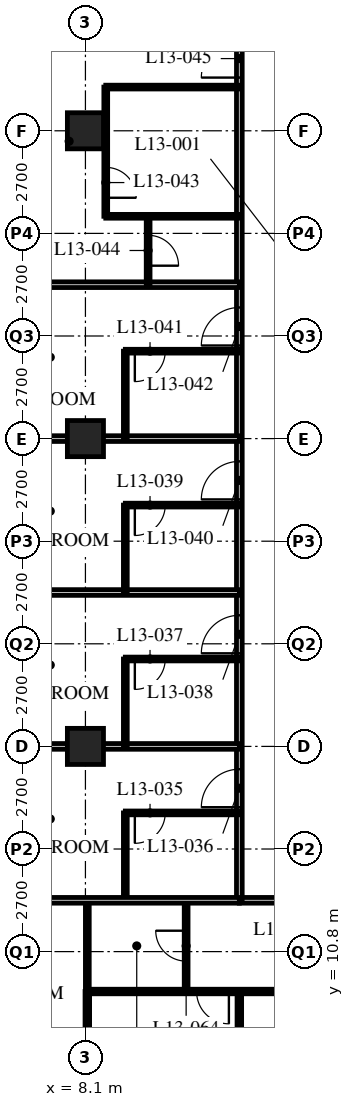
"""IFC4 building model, lengths in metres.
Left out: names, types, materials, properties, quantities, classifications, styles, units other than length and angle.
Written with IfcOpenShell. Run it as: python <this file> out.ifc"""

import sys

from ifc_helpers import new_model, si_unit, direction, frame, frame_2d, origin, origin_2d, place, context, subcontext, project, spatial, rectangle, hollow_rectangle, extrude, element, fill, save


model = new_model("IFC4")
c1 = context("Model", 3, precision=1e-05, world=origin(), true_north=direction((0.0, 1.0)))
c2 = subcontext(c1, "Body", "Model", "MODEL_VIEW")
j1 = project(units=[si_unit("LENGTHUNIT", "METRE"), si_unit("PLANEANGLEUNIT", "RADIAN")], contexts=[c1])
p1 = place(None, origin())
s1 = spatial("IfcSite", under=j1, at=p1, CompositionType="ELEMENT")
p2 = place(p1, origin())
s2 = spatial("IfcBuilding", under=s1, at=p2, CompositionType="ELEMENT")
p3 = place(p2, frame((0.0, 0.0, 56.8)))
s3 = spatial("IfcBuildingStorey", under=s2, at=p3, CompositionType="ELEMENT", Elevation=56.8)
for number, where, z_axis, x_axis in (
    (1, (8.1, 16.2, 0.0), (0.0, 0.0, 1.0), (1.0, 0.0, 0.0)),
    (2, (8.1, 24.3, 0.0), (0.0, 0.0, 1.0), (1.0, 0.0, 0.0)),
    (3, (8.1, 32.4, 0.0), (0.0, 0.0, 1.0), (1.0, 0.0, 0.0)),
):
    element("IfcColumn", number, at=place(p3, frame(where, z_axis=z_axis, x_axis=x_axis)), inside=s3, PredefinedType="COLUMN", context=c2, shape_type="SweptSolid", body=[
        extrude(hollow_rectangle(XDim=0.95, YDim=0.95, WallThickness=0.095, at=origin_2d()), origin(), (0.0, 0.0, 1.0), 3.4),
    ])
p4 = place(p3, frame((12.15, 12.15, 0.0), z_axis=(0.0, 0.0, 1.0), x_axis=(1.0, 0.0, 0.0)))
e4 = element("IfcWall", 4, at=p4, inside=s3, PredefinedType="PARTITIONING", context=c2, shape_type="SweptSolid", body=[
    extrude(rectangle(XDim=32.4, YDim=0.15, at=frame_2d((16.2, 0.0))), origin(), (0.0, 0.0, 1.0), 3.19),
])
p5 = place(p4, frame((6.5, 0.0, 0.0)))
e5 = element("IfcOpeningElement", 5, at=p5, cuts=e4, PredefinedType="OPENING", context=c2, shape_type="SweptSolid", body=[
    extrude(rectangle(XDim=1.0, YDim=2.1, at=frame_2d((0.5, 1.05))), frame((0.0, 0.085, 0.0), z_axis=(0.0, -1.0, 0.0), x_axis=(1.0, 0.0, 0.0)), (0.0, 0.0, 1.0), 0.17),
])
p6 = place(p4, frame((8.4, 0.0, 0.0)))
e6 = element("IfcOpeningElement", 6, at=p6, cuts=e4, PredefinedType="OPENING", context=c2, shape_type="SweptSolid", body=[
    extrude(rectangle(XDim=1.0, YDim=2.1, at=frame_2d((0.5, 1.05))), frame((0.0, 0.085, 0.0), z_axis=(0.0, -1.0, 0.0), x_axis=(1.0, 0.0, 0.0)), (0.0, 0.0, 1.0), 0.17),
])
p7 = place(p4, frame((14.6, 0.0, 0.0)))
e7 = element("IfcOpeningElement", 7, at=p7, cuts=e4, PredefinedType="OPENING", context=c2, shape_type="SweptSolid", body=[
    extrude(rectangle(XDim=1.0, YDim=2.1, at=frame_2d((0.5, 1.05))), frame((0.0, 0.085, 0.0), z_axis=(0.0, -1.0, 0.0), x_axis=(1.0, 0.0, 0.0)), (0.0, 0.0, 1.0), 0.17),
])
p8 = place(p4, frame((18.65, 0.0, 0.0)))
e8 = element("IfcOpeningElement", 8, at=p8, cuts=e4, PredefinedType="OPENING", context=c2, shape_type="SweptSolid", body=[
    extrude(rectangle(XDim=1.0, YDim=2.1, at=frame_2d((0.5, 1.05))), frame((0.0, 0.085, 0.0), z_axis=(0.0, -1.0, 0.0), x_axis=(1.0, 0.0, 0.0)), (0.0, 0.0, 1.0), 0.17),
])
p9 = place(p4, frame((20.55, 0.0, 0.0)))
e9 = element("IfcOpeningElement", 9, at=p9, cuts=e4, PredefinedType="OPENING", context=c2, shape_type="SweptSolid", body=[
    extrude(rectangle(XDim=1.0, YDim=2.1, at=frame_2d((0.5, 1.05))), frame((0.0, 0.085, 0.0), z_axis=(0.0, -1.0, 0.0), x_axis=(1.0, 0.0, 0.0)), (0.0, 0.0, 1.0), 0.17),
])
p10 = place(p4, frame((26.75, 0.0, 0.0)))
e10 = element("IfcOpeningElement", 10, at=p10, cuts=e4, PredefinedType="OPENING", context=c2, shape_type="SweptSolid", body=[
    extrude(rectangle(XDim=1.0, YDim=2.1, at=frame_2d((0.5, 1.05))), frame((0.0, 0.085, 0.0), z_axis=(0.0, -1.0, 0.0), x_axis=(1.0, 0.0, 0.0)), (0.0, 0.0, 1.0), 0.17),
])
p11 = place(p4, frame((1.525, 0.0, 0.0)))
e11 = element("IfcOpeningElement", 11, at=p11, cuts=e4, PredefinedType="OPENING", context=c2, shape_type="SweptSolid", body=[
    extrude(rectangle(XDim=1.0, YDim=2.1, at=frame_2d((0.5, 1.05))), frame((0.0, 0.085, 0.0), z_axis=(0.0, -1.0, 0.0), x_axis=(1.0, 0.0, 0.0)), (0.0, 0.0, 1.0), 0.17),
])
p12 = place(p4, frame((29.875, 0.0, 0.0)))
e12 = element("IfcOpeningElement", 12, at=p12, cuts=e4, PredefinedType="OPENING", context=c2, shape_type="SweptSolid", body=[
    extrude(rectangle(XDim=1.0, YDim=2.1, at=frame_2d((0.5, 1.05))), frame((0.0, 0.085, 0.0), z_axis=(0.0, -1.0, 0.0), x_axis=(1.0, 0.0, 0.0)), (0.0, 0.0, 1.0), 0.17),
])
p13 = place(p3, frame((12.15, 12.15, 0.0), z_axis=(0.0, 0.0, 1.0), x_axis=(0.0, 1.0, 0.0)))
e13 = element("IfcWall", 13, at=p13, inside=s3, PredefinedType="PARTITIONING", context=c2, shape_type="SweptSolid", body=[
    extrude(rectangle(XDim=30.15, YDim=0.15, at=frame_2d((15.075, 0.0))), origin(), (0.0, 0.0, 1.0), 3.19),
])
p14 = place(p13, frame((2.45, 0.0, 0.0)))
e14 = element("IfcOpeningElement", 14, at=p14, cuts=e13, PredefinedType="OPENING", context=c2, shape_type="SweptSolid", body=[
    extrude(rectangle(XDim=1.0, YDim=2.1, at=frame_2d((0.5, 1.05))), frame((0.0, 0.085, 0.0), z_axis=(0.0, -1.0, 0.0), x_axis=(1.0, 0.0, 0.0)), (0.0, 0.0, 1.0), 0.17),
])
p15 = place(p13, frame((6.5, 0.0, 0.0)))
e15 = element("IfcOpeningElement", 15, at=p15, cuts=e13, PredefinedType="OPENING", context=c2, shape_type="SweptSolid", body=[
    extrude(rectangle(XDim=1.0, YDim=2.1, at=frame_2d((0.5, 1.05))), frame((0.0, 0.085, 0.0), z_axis=(0.0, -1.0, 0.0), x_axis=(1.0, 0.0, 0.0)), (0.0, 0.0, 1.0), 0.17),
])
p16 = place(p13, frame((10.55, 0.0, 0.0)))
e16 = element("IfcOpeningElement", 16, at=p16, cuts=e13, PredefinedType="OPENING", context=c2, shape_type="SweptSolid", body=[
    extrude(rectangle(XDim=1.0, YDim=2.1, at=frame_2d((0.5, 1.05))), frame((0.0, 0.085, 0.0), z_axis=(0.0, -1.0, 0.0), x_axis=(1.0, 0.0, 0.0)), (0.0, 0.0, 1.0), 0.17),
])
p17 = place(p13, frame((14.6, 0.0, 0.0)))
e17 = element("IfcOpeningElement", 17, at=p17, cuts=e13, PredefinedType="OPENING", context=c2, shape_type="SweptSolid", body=[
    extrude(rectangle(XDim=1.0, YDim=2.1, at=frame_2d((0.5, 1.05))), frame((0.0, 0.085, 0.0), z_axis=(0.0, -1.0, 0.0), x_axis=(1.0, 0.0, 0.0)), (0.0, 0.0, 1.0), 0.17),
])
p18 = place(p13, frame((21.65, 0.0, 0.0)))
e18 = element("IfcOpeningElement", 18, at=p18, cuts=e13, PredefinedType="OPENING", context=c2, shape_type="SweptSolid", body=[
    extrude(rectangle(XDim=1.0, YDim=2.1, at=frame_2d((0.5, 1.05))), frame((0.0, 0.085, 0.0), z_axis=(0.0, -1.0, 0.0), x_axis=(1.0, 0.0, 0.0)), (0.0, 0.0, 1.0), 0.17),
])
p19 = place(p13, frame((26.7, 0.0, 0.0)))
e19 = element("IfcOpeningElement", 19, at=p19, cuts=e13, PredefinedType="OPENING", context=c2, shape_type="SweptSolid", body=[
    extrude(rectangle(XDim=1.0, YDim=2.1, at=frame_2d((0.5, 1.05))), frame((0.0, 0.085, 0.0), z_axis=(0.0, -1.0, 0.0), x_axis=(1.0, 0.0, 0.0)), (0.0, 0.0, 1.0), 0.17),
])
p20 = place(p3, frame((9.15, 12.15, 0.0), z_axis=(0.0, 0.0, 1.0), x_axis=(0.0, 1.0, 0.0)))
e20 = element("IfcWall", 20, at=p20, inside=s3, PredefinedType="PARTITIONING", context=c2, shape_type="SweptSolid", body=[
    extrude(rectangle(XDim=2.3, YDim=0.1, at=frame_2d((1.15, 0.0))), origin(), (0.0, 0.0, 1.0), 3.19),
])
p21 = place(p3, frame((12.15, 14.45, 0.0), z_axis=(0.0, 0.0, 1.0), x_axis=(-1.0, 0.0, 0.0)))
e21 = element("IfcWall", 21, at=p21, inside=s3, PredefinedType="PARTITIONING", context=c2, shape_type="SweptSolid", body=[
    extrude(rectangle(XDim=3.0, YDim=0.1, at=frame_2d((1.5, 0.0))), origin(), (0.0, 0.0, 1.0), 3.19),
])
p22 = place(p21, frame((1.95, 0.0, 0.0)))
e22 = element("IfcOpeningElement", 22, at=p22, cuts=e21, PredefinedType="OPENING", context=c2, shape_type="SweptSolid", body=[
    extrude(rectangle(XDim=0.8, YDim=2.1, at=frame_2d((0.4, 1.05))), frame((0.0, 0.06, 0.0), z_axis=(0.0, -1.0, 0.0), x_axis=(1.0, 0.0, 0.0)), (0.0, 0.0, 1.0), 0.12),
])
p23 = place(p3, frame((12.15, 16.2, 0.0), z_axis=(0.0, 0.0, 1.0), x_axis=(-1.0, 0.0, 0.0)))
e23 = element("IfcWall", 23, at=p23, inside=s3, PredefinedType="PARTITIONING", context=c2, shape_type="SweptSolid", body=[
    extrude(rectangle(XDim=11.85, YDim=0.15, at=frame_2d((5.925, 0.0))), origin(), (0.0, 0.0, 1.0), 2.578),
])
p24 = place(p3, frame((9.15, 16.2, 0.0), z_axis=(0.0, 0.0, 1.0), x_axis=(0.0, 1.0, 0.0)))
e24 = element("IfcWall", 24, at=p24, inside=s3, PredefinedType="PARTITIONING", context=c2, shape_type="SweptSolid", body=[
    extrude(rectangle(XDim=2.3, YDim=0.1, at=frame_2d((1.15, 0.0))), origin(), (0.0, 0.0, 1.0), 3.19),
])
p25 = place(p3, frame((12.15, 18.5, 0.0), z_axis=(0.0, 0.0, 1.0), x_axis=(-1.0, 0.0, 0.0)))
e25 = element("IfcWall", 25, at=p25, inside=s3, PredefinedType="PARTITIONING", context=c2, shape_type="SweptSolid", body=[
    extrude(rectangle(XDim=3.0, YDim=0.1, at=frame_2d((1.5, 0.0))), origin(), (0.0, 0.0, 1.0), 3.19),
])
p26 = place(p25, frame((1.95, 0.0, 0.0)))
e26 = element("IfcOpeningElement", 26, at=p26, cuts=e25, PredefinedType="OPENING", context=c2, shape_type="SweptSolid", body=[
    extrude(rectangle(XDim=0.8, YDim=2.1, at=frame_2d((0.4, 1.05))), frame((0.0, 0.06, 0.0), z_axis=(0.0, -1.0, 0.0), x_axis=(1.0, 0.0, 0.0)), (0.0, 0.0, 1.0), 0.12),
])
p27 = place(p3, frame((12.15, 20.25, 0.0), z_axis=(0.0, 0.0, 1.0), x_axis=(-1.0, 0.0, 0.0)))
e27 = element("IfcWall", 27, at=p27, inside=s3, PredefinedType="PARTITIONING", context=c2, shape_type="SweptSolid", body=[
    extrude(rectangle(XDim=11.85, YDim=0.15, at=frame_2d((5.925, 0.0))), origin(), (0.0, 0.0, 1.0), 3.19),
])
p28 = place(p3, frame((9.15, 20.25, 0.0), z_axis=(0.0, 0.0, 1.0), x_axis=(0.0, 1.0, 0.0)))
e28 = element("IfcWall", 28, at=p28, inside=s3, PredefinedType="PARTITIONING", context=c2, shape_type="SweptSolid", body=[
    extrude(rectangle(XDim=2.3, YDim=0.1, at=frame_2d((1.15, 0.0))), origin(), (0.0, 0.0, 1.0), 3.19),
])
p29 = place(p3, frame((12.15, 22.55, 0.0), z_axis=(0.0, 0.0, 1.0), x_axis=(-1.0, 0.0, 0.0)))
e29 = element("IfcWall", 29, at=p29, inside=s3, PredefinedType="PARTITIONING", context=c2, shape_type="SweptSolid", body=[
    extrude(rectangle(XDim=3.0, YDim=0.1, at=frame_2d((1.5, 0.0))), origin(), (0.0, 0.0, 1.0), 3.19),
])
p30 = place(p29, frame((1.95, 0.0, 0.0)))
e30 = element("IfcOpeningElement", 30, at=p30, cuts=e29, PredefinedType="OPENING", context=c2, shape_type="SweptSolid", body=[
    extrude(rectangle(XDim=0.8, YDim=2.1, at=frame_2d((0.4, 1.05))), frame((0.0, 0.06, 0.0), z_axis=(0.0, -1.0, 0.0), x_axis=(1.0, 0.0, 0.0)), (0.0, 0.0, 1.0), 0.12),
])
p31 = place(p3, frame((12.15, 24.3, 0.0), z_axis=(0.0, 0.0, 1.0), x_axis=(-1.0, 0.0, 0.0)))
e31 = element("IfcWall", 31, at=p31, inside=s3, PredefinedType="PARTITIONING", context=c2, shape_type="SweptSolid", body=[
    extrude(rectangle(XDim=11.85, YDim=0.15, at=frame_2d((5.925, 0.0))), origin(), (0.0, 0.0, 1.0), 2.578),
])
p32 = place(p3, frame((9.15, 24.3, 0.0), z_axis=(0.0, 0.0, 1.0), x_axis=(0.0, 1.0, 0.0)))
e32 = element("IfcWall", 32, at=p32, inside=s3, PredefinedType="PARTITIONING", context=c2, shape_type="SweptSolid", body=[
    extrude(rectangle(XDim=2.3, YDim=0.1, at=frame_2d((1.15, 0.0))), origin(), (0.0, 0.0, 1.0), 3.19),
])
p33 = place(p3, frame((12.15, 26.6, 0.0), z_axis=(0.0, 0.0, 1.0), x_axis=(-1.0, 0.0, 0.0)))
e33 = element("IfcWall", 33, at=p33, inside=s3, PredefinedType="PARTITIONING", context=c2, shape_type="SweptSolid", body=[
    extrude(rectangle(XDim=3.0, YDim=0.1, at=frame_2d((1.5, 0.0))), origin(), (0.0, 0.0, 1.0), 3.19),
])
p34 = place(p33, frame((1.95, 0.0, 0.0)))
e34 = element("IfcOpeningElement", 34, at=p34, cuts=e33, PredefinedType="OPENING", context=c2, shape_type="SweptSolid", body=[
    extrude(rectangle(XDim=0.8, YDim=2.1, at=frame_2d((0.4, 1.05))), frame((0.0, 0.06, 0.0), z_axis=(0.0, -1.0, 0.0), x_axis=(1.0, 0.0, 0.0)), (0.0, 0.0, 1.0), 0.12),
])
p35 = place(p3, frame((12.15, 28.35, 0.0), z_axis=(0.0, 0.0, 1.0), x_axis=(-1.0, 0.0, 0.0)))
e35 = element("IfcWall", 35, at=p35, inside=s3, PredefinedType="PARTITIONING", context=c2, shape_type="SweptSolid", body=[
    extrude(rectangle(XDim=11.85, YDim=0.15, at=frame_2d((5.925, 0.0))), origin(), (0.0, 0.0, 1.0), 3.19),
])
p36 = place(p3, frame((8.635, 30.15, 0.0), z_axis=(0.0, 0.0, 1.0), x_axis=(0.0, 1.0, 0.0)))
e36 = element("IfcWall", 36, at=p36, inside=s3, PredefinedType="PARTITIONING", context=c2, shape_type="SweptSolid", body=[
    extrude(rectangle(XDim=3.4, YDim=0.1, at=frame_2d((1.7, 0.0))), origin(), (0.0, 0.0, 1.0), 3.19),
])
p37 = place(p36, frame((0.488, 0.0, 0.0)))
e37 = element("IfcOpeningElement", 37, at=p37, cuts=e36, PredefinedType="OPENING", context=c2, shape_type="SweptSolid", body=[
    extrude(rectangle(XDim=0.8, YDim=2.1, at=frame_2d((0.4, 1.05))), frame((0.0, 0.06, 0.0), z_axis=(0.0, -1.0, 0.0), x_axis=(1.0, 0.0, 0.0)), (0.0, 0.0, 1.0), 0.12),
])
p38 = place(p3, frame((9.75, 28.35, 0.0), z_axis=(0.0, 0.0, 1.0), x_axis=(0.0, 1.0, 0.0)))
e38 = element("IfcWall", 38, at=p38, inside=s3, PredefinedType="PARTITIONING", context=c2, shape_type="SweptSolid", body=[
    extrude(rectangle(XDim=1.8, YDim=0.1, at=frame_2d((0.9, 0.0))), origin(), (0.0, 0.0, 1.0), 3.19),
])
p39 = place(p38, frame((0.5, 0.0, 0.0)))
e39 = element("IfcOpeningElement", 39, at=p39, cuts=e38, PredefinedType="OPENING", context=c2, shape_type="SweptSolid", body=[
    extrude(rectangle(XDim=0.8, YDim=2.1, at=frame_2d((0.4, 1.05))), frame((0.0, 0.06, 0.0), z_axis=(0.0, -1.0, 0.0), x_axis=(1.0, 0.0, 0.0)), (0.0, 0.0, 1.0), 0.12),
])
for number, where, z_axis, x_axis in (
    (40, (12.15, 30.15, 0.0), (0.0, 0.0, 1.0), (-1.0, 0.0, 0.0)),
    (41, (12.15, 33.55, 0.0), (0.0, 0.0, 1.0), (-1.0, 0.0, 0.0)),
):
    element("IfcWall", number, at=place(p3, frame(where, z_axis=z_axis, x_axis=x_axis)), inside=s3, PredefinedType="PARTITIONING", context=c2, shape_type="SweptSolid", body=[
        extrude(rectangle(XDim=3.515, YDim=0.1, at=frame_2d((1.757, 0.0))), origin(), (0.0, 0.0, 1.0), 3.19),
    ])
p40 = place(p3, frame((10.75, 12.15, 0.0), z_axis=(0.0, 0.0, 1.0), x_axis=(0.0, -1.0, 0.0)))
e42 = element("IfcWall", 42, at=p40, inside=s3, PredefinedType="PARTITIONING", context=c2, shape_type="SweptSolid", body=[
    extrude(rectangle(XDim=2.4, YDim=0.1, at=frame_2d((1.2, 0.0))), origin(), (0.0, 0.0, 1.0), 3.19),
])
p41 = place(p40, frame((0.8, 0.0, 0.0)))
e43 = element("IfcOpeningElement", 43, at=p41, cuts=e42, PredefinedType="OPENING", context=c2, shape_type="SweptSolid", body=[
    extrude(rectangle(XDim=0.8, YDim=2.1, at=frame_2d((0.4, 1.05))), frame((0.0, 0.06, 0.0), z_axis=(0.0, -1.0, 0.0), x_axis=(1.0, 0.0, 0.0)), (0.0, 0.0, 1.0), 0.12),
])
p42 = place(p3, frame((8.15, 12.15, 0.0), z_axis=(0.0, 0.0, 1.0), x_axis=(0.0, -1.0, 0.0)))
e44 = element("IfcWall", 44, at=p42, inside=s3, PredefinedType="PARTITIONING", context=c2, shape_type="SweptSolid", body=[
    extrude(rectangle(XDim=2.4, YDim=0.1, at=frame_2d((1.2, 0.0))), origin(), (0.0, 0.0, 1.0), 2.578),
])
p43 = place(p3, frame((8.15, 9.75, 0.0), z_axis=(0.0, 0.0, 1.0), x_axis=(1.0, 0.0, 0.0)))
e45 = element("IfcWall", 45, at=p43, inside=s3, PredefinedType="PARTITIONING", context=c2, shape_type="SweptSolid", body=[
    extrude(rectangle(XDim=8.05, YDim=0.12, at=frame_2d((4.025, 0.0))), origin(), (0.0, 0.0, 1.0), 3.19),
])
p44 = place(p43, frame((6.725, 0.0, 0.0)))
e46 = element("IfcOpeningElement", 46, at=p44, cuts=e45, PredefinedType="OPENING", context=c2, shape_type="SweptSolid", body=[
    extrude(rectangle(XDim=0.85, YDim=2.1, at=frame_2d((0.425, 1.05))), frame((0.0, 0.07, 0.0), z_axis=(0.0, -1.0, 0.0), x_axis=(1.0, 0.0, 0.0)), (0.0, 0.0, 1.0), 0.14),
])
p45 = place(p43, frame((2.875, 0.0, 0.0)))
e47 = element("IfcOpeningElement", 47, at=p45, cuts=e45, PredefinedType="OPENING", context=c2, shape_type="SweptSolid", body=[
    extrude(rectangle(XDim=0.85, YDim=2.1, at=frame_2d((0.425, 1.05))), frame((0.0, 0.07, 0.0), z_axis=(0.0, -1.0, 0.0), x_axis=(1.0, 0.0, 0.0)), (0.0, 0.0, 1.0), 0.14),
])
p46 = place(p3, frame((12.15, 9.75, 0.0), z_axis=(0.0, 0.0, 1.0), x_axis=(0.0, -1.0, 0.0)))
e48 = element("IfcWall", 48, at=p46, inside=s3, PredefinedType="PARTITIONING", context=c2, shape_type="SweptSolid", body=[
    extrude(rectangle(XDim=9.45, YDim=0.12, at=frame_2d((4.725, 0.0))), origin(), (0.0, 0.0, 1.0), 3.19),
])
p47 = place(p3, frame((0.3, 12.15, 0.0), z_axis=(0.0, 0.0, 1.0), x_axis=(1.0, 0.0, 0.0)))
e49 = element("IfcWall", 49, at=p47, inside=s3, PredefinedType="PARTITIONING", context=c2, shape_type="SweptSolid", body=[
    extrude(rectangle(XDim=11.85, YDim=0.15, at=frame_2d((5.925, 0.0))), origin(), (0.0, 0.0, 1.0), 3.19),
])
p48 = place(p3, frame((8.15, 9.75, 0.0), z_axis=(0.0, 0.0, 1.0), x_axis=(0.0, -1.0, 0.0)))
e50 = element("IfcWall", 50, at=p48, inside=s3, PredefinedType="PARTITIONING", context=c2, shape_type="SweptSolid", body=[
    extrude(rectangle(XDim=1.175, YDim=0.12, at=frame_2d((0.587, 0.0))), origin(), (0.0, 0.0, 1.0), 2.578),
])
p49 = place(p22, origin())
e51 = element("IfcDoor", 51, at=p49, inside=s3, OperationType="SINGLE_SWING_RIGHT", PredefinedType="DOOR", context=c2, shape_type="SweptSolid", body=[
    extrude(rectangle(XDim=0.8, YDim=2.1, at=frame_2d((0.4, 1.05))), frame((0.0, 0.025, 0.0), z_axis=(0.0, -1.0, 0.0), x_axis=(1.0, 0.0, 0.0)), (0.0, 0.0, 1.0), 0.05),
])
fill(e22, e51)
p50 = place(p14, origin())
e52 = element("IfcDoor", 52, at=p50, inside=s3, OperationType="SINGLE_SWING_LEFT", PredefinedType="DOOR", context=c2, shape_type="SweptSolid", body=[
    extrude(rectangle(XDim=1.0, YDim=2.1, at=frame_2d((0.5, 1.05))), frame((0.0, 0.025, 0.0), z_axis=(0.0, -1.0, 0.0), x_axis=(1.0, 0.0, 0.0)), (0.0, 0.0, 1.0), 0.05),
])
fill(e14, e52)
p51 = place(p26, origin())
e53 = element("IfcDoor", 53, at=p51, inside=s3, OperationType="SINGLE_SWING_RIGHT", PredefinedType="DOOR", context=c2, shape_type="SweptSolid", body=[
    extrude(rectangle(XDim=0.8, YDim=2.1, at=frame_2d((0.4, 1.05))), frame((0.0, 0.025, 0.0), z_axis=(0.0, -1.0, 0.0), x_axis=(1.0, 0.0, 0.0)), (0.0, 0.0, 1.0), 0.05),
])
fill(e26, e53)
p52 = place(p15, origin())
e54 = element("IfcDoor", 54, at=p52, inside=s3, OperationType="SINGLE_SWING_LEFT", PredefinedType="DOOR", context=c2, shape_type="SweptSolid", body=[
    extrude(rectangle(XDim=1.0, YDim=2.1, at=frame_2d((0.5, 1.05))), frame((0.0, 0.025, 0.0), z_axis=(0.0, -1.0, 0.0), x_axis=(1.0, 0.0, 0.0)), (0.0, 0.0, 1.0), 0.05),
])
fill(e15, e54)
p53 = place(p30, origin())
e55 = element("IfcDoor", 55, at=p53, inside=s3, OperationType="SINGLE_SWING_RIGHT", PredefinedType="DOOR", context=c2, shape_type="SweptSolid", body=[
    extrude(rectangle(XDim=0.8, YDim=2.1, at=frame_2d((0.4, 1.05))), frame((0.0, 0.025, 0.0), z_axis=(0.0, -1.0, 0.0), x_axis=(1.0, 0.0, 0.0)), (0.0, 0.0, 1.0), 0.05),
])
fill(e30, e55)
p54 = place(p16, origin())
e56 = element("IfcDoor", 56, at=p54, inside=s3, OperationType="SINGLE_SWING_LEFT", PredefinedType="DOOR", context=c2, shape_type="SweptSolid", body=[
    extrude(rectangle(XDim=1.0, YDim=2.1, at=frame_2d((0.5, 1.05))), frame((0.0, 0.025, 0.0), z_axis=(0.0, -1.0, 0.0), x_axis=(1.0, 0.0, 0.0)), (0.0, 0.0, 1.0), 0.05),
])
fill(e16, e56)
p55 = place(p34, origin())
e57 = element("IfcDoor", 57, at=p55, inside=s3, OperationType="SINGLE_SWING_RIGHT", PredefinedType="DOOR", context=c2, shape_type="SweptSolid", body=[
    extrude(rectangle(XDim=0.8, YDim=2.1, at=frame_2d((0.4, 1.05))), frame((0.0, 0.025, 0.0), z_axis=(0.0, -1.0, 0.0), x_axis=(1.0, 0.0, 0.0)), (0.0, 0.0, 1.0), 0.05),
])
fill(e34, e57)
p56 = place(p17, origin())
e58 = element("IfcDoor", 58, at=p56, inside=s3, OperationType="SINGLE_SWING_LEFT", PredefinedType="DOOR", context=c2, shape_type="SweptSolid", body=[
    extrude(rectangle(XDim=1.0, YDim=2.1, at=frame_2d((0.5, 1.05))), frame((0.0, 0.025, 0.0), z_axis=(0.0, -1.0, 0.0), x_axis=(1.0, 0.0, 0.0)), (0.0, 0.0, 1.0), 0.05),
])
fill(e17, e58)
p57 = place(p37, origin())
e59 = element("IfcDoor", 59, at=p57, inside=s3, OperationType="SINGLE_SWING_RIGHT", PredefinedType="DOOR", context=c2, shape_type="SweptSolid", body=[
    extrude(rectangle(XDim=0.8, YDim=2.1, at=frame_2d((0.4, 1.05))), frame((0.0, 0.025, 0.0), z_axis=(0.0, -1.0, 0.0), x_axis=(1.0, 0.0, 0.0)), (0.0, 0.0, 1.0), 0.05),
])
fill(e37, e59)
p58 = place(p39, origin())
e60 = element("IfcDoor", 60, at=p58, inside=s3, OperationType="SINGLE_SWING_RIGHT", PredefinedType="DOOR", context=c2, shape_type="SweptSolid", body=[
    extrude(rectangle(XDim=0.8, YDim=2.1, at=frame_2d((0.4, 1.05))), frame((0.0, 0.025, 0.0), z_axis=(0.0, -1.0, 0.0), x_axis=(1.0, 0.0, 0.0)), (0.0, 0.0, 1.0), 0.05),
])
fill(e39, e60)
p59 = place(p18, origin())
e61 = element("IfcDoor", 61, at=p59, inside=s3, OperationType="SINGLE_SWING_LEFT", PredefinedType="DOOR", context=c2, shape_type="SweptSolid", body=[
    extrude(rectangle(XDim=1.0, YDim=2.1, at=frame_2d((0.5, 1.05))), frame((0.0, 0.025, 0.0), z_axis=(0.0, -1.0, 0.0), x_axis=(1.0, 0.0, 0.0)), (0.0, 0.0, 1.0), 0.05),
])
fill(e18, e61)
p60 = place(p41, origin())
e62 = element("IfcDoor", 62, at=p60, inside=s3, OperationType="SINGLE_SWING_RIGHT", PredefinedType="DOOR", context=c2, shape_type="SweptSolid", body=[
    extrude(rectangle(XDim=0.8, YDim=2.1, at=frame_2d((0.4, 1.05))), frame((0.0, 0.025, 0.0), z_axis=(0.0, -1.0, 0.0), x_axis=(1.0, 0.0, 0.0)), (0.0, 0.0, 1.0), 0.05),
])
fill(e43, e62)
p61 = place(p45, origin())
e63 = element("IfcDoor", 63, at=p61, inside=s3, OperationType="SINGLE_SWING_LEFT", PredefinedType="DOOR", context=c2, shape_type="SweptSolid", body=[
    extrude(rectangle(XDim=0.85, YDim=2.1, at=frame_2d((0.425, 1.05))), frame((0.0, 0.025, 0.0), z_axis=(0.0, -1.0, 0.0), x_axis=(1.0, 0.0, 0.0)), (0.0, 0.0, 1.0), 0.05),
])
fill(e47, e63)
save(model, sys.argv[1])
